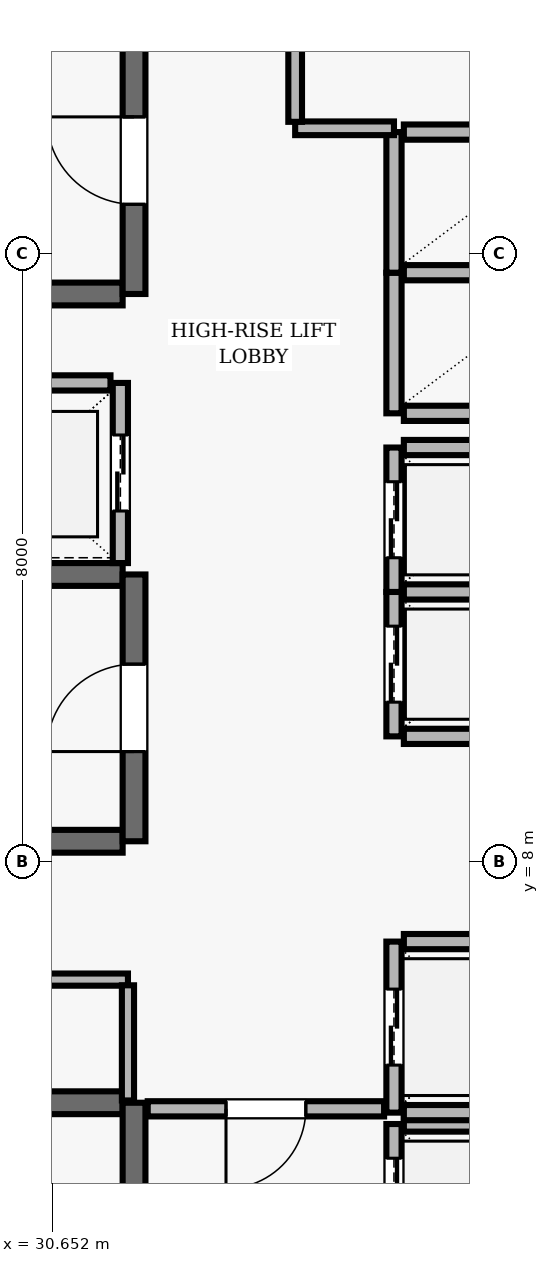
"""IFC4 building model, lengths in metres.
Left out: names, types, materials, properties, quantities, classifications, styles, units other than length and angle.
Written with IfcOpenShell. Run it as: python <this file> out.ifc"""

import sys

from ifc_helpers import new_model, si_unit, direction, frame, frame_2d, origin, place, context, subcontext, project, spatial, rectangle, extrude, element, fill, save


model = new_model("IFC4")
c1 = context("Model", 3, precision=1e-05, world=origin(), true_north=direction((0.0, 1.0)))
c2 = subcontext(c1, "Body", "Model", "MODEL_VIEW")
j1 = project(units=[si_unit("LENGTHUNIT", "METRE"), si_unit("PLANEANGLEUNIT", "RADIAN")], contexts=[c1])
p1 = place(None, origin())
s1 = spatial("IfcSite", under=j1, at=p1, CompositionType="ELEMENT")
p2 = place(p1, origin())
s2 = spatial("IfcBuilding", under=s1, at=p2, CompositionType="ELEMENT")
p3 = place(p2, frame((0.0, 0.0, 252.1)))
s3 = spatial("IfcBuildingStorey", under=s2, at=p3, CompositionType="ELEMENT", Elevation=252.1)
p4 = place(p3, frame((31.58, 4.83, 0.0), z_axis=(0.0, 0.0, 1.0), x_axis=(-1.0, 0.0, 0.0)))
e1 = element("IfcWall", 1, at=p4, inside=s3, PredefinedType="SHEAR", context=c2, shape_type="SweptSolid", body=[
    extrude(rectangle(XDim=8.36, YDim=0.3, at=frame_2d((4.18, 0.0))), origin(), (0.0, 0.0, 1.0), 3.69),
])
p5 = place(p3, frame((31.73, 0.96, 0.0), z_axis=(0.0, 0.0, 1.0), x_axis=(0.0, 1.0, 0.0)))
e2 = element("IfcWall", 2, at=p5, inside=s3, PredefinedType="SHEAR", context=c2, shape_type="SweptSolid", body=[
    extrude(rectangle(XDim=3.87, YDim=0.3, at=frame_2d((1.935, 0.0))), origin(), (0.0, 0.0, 1.0), 3.69),
])
p6 = place(p5, frame((1.54, 0.0, 0.0)))
e3 = element("IfcOpeningElement", 3, at=p6, cuts=e2, PredefinedType="OPENING", context=c2, shape_type="SweptSolid", body=[
    extrude(rectangle(XDim=1.15, YDim=2.15, at=frame_2d((0.575, 1.075))), frame((0.0, 0.16, 0.0), z_axis=(0.0, -1.0, 0.0), x_axis=(1.0, 0.0, 0.0)), (0.0, 0.0, 1.0), 0.32),
])
p7 = place(p3, frame((23.22, 15.47, 0.0), z_axis=(0.0, 0.0, 1.0), x_axis=(1.0, 0.0, 0.0)))
e4 = element("IfcWall", 4, at=p7, inside=s3, PredefinedType="SHEAR", context=c2, shape_type="SweptSolid", body=[
    extrude(rectangle(XDim=8.36, YDim=0.3, at=frame_2d((4.18, 0.0))), origin(), (0.0, 0.0, 1.0), 3.69),
])
p8 = place(p3, frame((31.73, 15.47, 0.0), z_axis=(0.0, 0.0, 1.0), x_axis=(0.0, 1.0, 0.0)))
e5 = element("IfcWall", 5, at=p8, inside=s3, PredefinedType="SHEAR", context=c2, shape_type="SweptSolid", body=[
    extrude(rectangle(XDim=3.51, YDim=0.3, at=frame_2d((1.755, 0.0))), origin(), (0.0, 0.0, 1.0), 3.69),
])
p9 = place(p8, frame((1.18, 0.0, 0.0)))
e6 = element("IfcOpeningElement", 6, at=p9, cuts=e5, PredefinedType="OPENING", context=c2, shape_type="SweptSolid", body=[
    extrude(rectangle(XDim=1.15, YDim=2.15, at=frame_2d((0.575, 1.075))), frame((0.0, 0.16, 0.0), z_axis=(0.0, -1.0, 0.0), x_axis=(1.0, 0.0, 0.0)), (0.0, 0.0, 1.0), 0.32),
])
for number, where, z_axis, x_axis in (
    (7, (31.58, 11.78, 0.0), (0.0, 0.0, 1.0), (-1.0, 0.0, 0.0)),
    (8, (23.22, 8.27, 0.0), (0.0, 0.0, 1.0), (1.0, 0.0, 0.0)),
):
    element("IfcWall", number, at=place(p3, frame(where, z_axis=z_axis, x_axis=x_axis)), inside=s3, PredefinedType="SHEAR", context=c2, shape_type="SweptSolid", body=[
        extrude(rectangle(XDim=8.36, YDim=0.3, at=frame_2d((4.18, 0.0))), origin(), (0.0, 0.0, 1.0), 3.69),
    ])
p10 = place(p3, frame((31.73, 8.27, 0.0), z_axis=(0.0, 0.0, 1.0), x_axis=(0.0, 1.0, 0.0)))
e9 = element("IfcWall", 9, at=p10, inside=s3, PredefinedType="SHEAR", context=c2, shape_type="SweptSolid", body=[
    extrude(rectangle(XDim=3.51, YDim=0.3, at=frame_2d((1.755, 0.0))), origin(), (0.0, 0.0, 1.0), 3.69),
])
p11 = place(p10, frame((1.18, 0.0, 0.0)))
e10 = element("IfcOpeningElement", 10, at=p11, cuts=e9, PredefinedType="OPENING", context=c2, shape_type="SweptSolid", body=[
    extrude(rectangle(XDim=1.15, YDim=2.15, at=frame_2d((0.575, 1.075))), frame((0.0, 0.16, 0.0), z_axis=(0.0, -1.0, 0.0), x_axis=(1.0, 0.0, 0.0)), (0.0, 0.0, 1.0), 0.32),
])
p12 = place(p3, frame((35.15, 4.55, 0.0), z_axis=(0.0, 0.0, 1.0), x_axis=(0.0, -1.0, 0.0)))
e11 = element("IfcWall", 11, at=p12, inside=s3, PredefinedType="SOLIDWALL", context=c2, shape_type="SweptSolid", body=[
    extrude(rectangle(XDim=2.1, YDim=0.2, at=frame_2d((1.05, 0.0))), origin(), (0.0, 0.0, 1.0), 3.69),
])
p13 = place(p12, frame((0.45, 0.0, 0.0)))
e12 = element("IfcOpeningElement", 12, at=p13, cuts=e11, PredefinedType="OPENING", context=c2, shape_type="SweptSolid", body=[
    extrude(rectangle(XDim=1.2, YDim=2.15, at=frame_2d((0.6, 1.075))), frame((0.0, 0.11, 0.0), z_axis=(0.0, -1.0, 0.0), x_axis=(1.0, 0.0, 0.0)), (0.0, 0.0, 1.0), 0.22),
])
p14 = place(p3, frame((37.42, 4.55, 0.0), z_axis=(0.0, 0.0, 1.0), x_axis=(-1.0, 0.0, 0.0)))
e13 = element("IfcWall", 13, at=p14, inside=s3, PredefinedType="SOLIDWALL", context=c2, shape_type="SweptSolid", body=[
    extrude(rectangle(XDim=2.14, YDim=0.2, at=frame_2d((1.07, 0.0))), origin(), (0.0, 0.0, 1.0), 3.69),
])
p15 = place(p3, frame((35.15, 6.95, 0.0), z_axis=(0.0, 0.0, 1.0), x_axis=(0.0, -1.0, 0.0)))
e14 = element("IfcWall", 14, at=p15, inside=s3, PredefinedType="SOLIDWALL", context=c2, shape_type="SweptSolid", body=[
    extrude(rectangle(XDim=2.25, YDim=0.2, at=frame_2d((1.125, 0.0))), origin(), (0.0, 0.0, 1.0), 3.69),
])
p16 = place(p15, frame((0.625, 0.0, 0.0)))
e15 = element("IfcOpeningElement", 15, at=p16, cuts=e14, PredefinedType="OPENING", context=c2, shape_type="SweptSolid", body=[
    extrude(rectangle(XDim=1.0, YDim=2.1, at=frame_2d((0.5, 1.05))), frame((0.0, 0.11, 0.0), z_axis=(0.0, -1.0, 0.0), x_axis=(1.0, 0.0, 0.0)), (0.0, 0.0, 1.0), 0.22),
])
for number, where, z_axis, x_axis in (
    (16, (35.28, 4.7, 0.0), (0.0, 0.0, 1.0), (1.0, 0.0, 0.0)),
    (17, (37.42, 6.95, 0.0), (0.0, 0.0, 1.0), (-1.0, 0.0, 0.0)),
):
    element("IfcWall", number, at=place(p3, frame(where, z_axis=z_axis, x_axis=x_axis)), inside=s3, PredefinedType="SOLIDWALL", context=c2, shape_type="SweptSolid", body=[
        extrude(rectangle(XDim=2.14, YDim=0.2, at=frame_2d((1.07, 0.0))), origin(), (0.0, 0.0, 1.0), 3.69),
    ])
p17 = place(p3, frame((35.15, 11.55, 0.0), z_axis=(0.0, 0.0, 1.0), x_axis=(0.0, -1.0, 0.0)))
e18 = element("IfcWall", 18, at=p17, inside=s3, PredefinedType="SOLIDWALL", context=c2, shape_type="SweptSolid", body=[
    extrude(rectangle(XDim=1.9, YDim=0.2, at=frame_2d((0.95, 0.0))), origin(), (0.0, 0.0, 1.0), 3.69),
])
p18 = place(p17, frame((0.45, 0.0, 0.0)))
e19 = element("IfcOpeningElement", 19, at=p18, cuts=e18, PredefinedType="OPENING", context=c2, shape_type="SweptSolid", body=[
    extrude(rectangle(XDim=1.0, YDim=2.1, at=frame_2d((0.5, 1.05))), frame((0.0, 0.11, 0.0), z_axis=(0.0, -1.0, 0.0), x_axis=(1.0, 0.0, 0.0)), (0.0, 0.0, 1.0), 0.22),
])
for number, where, z_axis, x_axis in (
    (20, (35.28, 9.65, 0.0), (0.0, 0.0, 1.0), (1.0, 0.0, 0.0)),
    (21, (37.42, 11.55, 0.0), (0.0, 0.0, 1.0), (-1.0, 0.0, 0.0)),
):
    element("IfcWall", number, at=place(p3, frame(where, z_axis=z_axis, x_axis=x_axis)), inside=s3, PredefinedType="SOLIDWALL", context=c2, shape_type="SweptSolid", body=[
        extrude(rectangle(XDim=2.14, YDim=0.2, at=frame_2d((1.07, 0.0))), origin(), (0.0, 0.0, 1.0), 3.69),
    ])
p19 = place(p3, frame((35.15, 13.45, 0.0), z_axis=(0.0, 0.0, 1.0), x_axis=(0.0, -1.0, 0.0)))
e22 = element("IfcWall", 22, at=p19, inside=s3, PredefinedType="SOLIDWALL", context=c2, shape_type="SweptSolid", body=[
    extrude(rectangle(XDim=1.9, YDim=0.2, at=frame_2d((0.95, 0.0))), origin(), (0.0, 0.0, 1.0), 3.69),
])
p20 = place(p19, frame((0.45, 0.0, 0.0)))
e23 = element("IfcOpeningElement", 23, at=p20, cuts=e22, PredefinedType="OPENING", context=c2, shape_type="SweptSolid", body=[
    extrude(rectangle(XDim=1.0, YDim=2.1, at=frame_2d((0.5, 1.05))), frame((0.0, 0.11, 0.0), z_axis=(0.0, -1.0, 0.0), x_axis=(1.0, 0.0, 0.0)), (0.0, 0.0, 1.0), 0.22),
])
p21 = place(p3, frame((37.42, 13.45, 0.0), z_axis=(0.0, 0.0, 1.0), x_axis=(-1.0, 0.0, 0.0)))
e24 = element("IfcWall", 24, at=p21, inside=s3, PredefinedType="SOLIDWALL", context=c2, shape_type="SweptSolid", body=[
    extrude(rectangle(XDim=2.14, YDim=0.2, at=frame_2d((1.07, 0.0))), origin(), (0.0, 0.0, 1.0), 3.69),
])
p22 = place(p3, frame((31.55, 11.93, 0.0), z_axis=(0.0, 0.0, 1.0), x_axis=(0.0, 1.0, 0.0)))
e25 = element("IfcWall", 25, at=p22, inside=s3, PredefinedType="SOLIDWALL", context=c2, shape_type="SweptSolid", body=[
    extrude(rectangle(XDim=2.37, YDim=0.2, at=frame_2d((1.185, 0.0))), origin(), (0.0, 0.0, 1.0), 3.69),
])
p23 = place(p22, frame((0.685, 0.0, 0.0)))
e26 = element("IfcOpeningElement", 26, at=p23, cuts=e25, PredefinedType="OPENING", context=c2, shape_type="SweptSolid", body=[
    extrude(rectangle(XDim=1.0, YDim=2.1, at=frame_2d((0.5, 1.05))), frame((0.0, 0.11, 0.0), z_axis=(0.0, -1.0, 0.0), x_axis=(1.0, 0.0, 0.0)), (0.0, 0.0, 1.0), 0.22),
])
p24 = place(p3, frame((31.42, 14.3, 0.0), z_axis=(0.0, 0.0, 1.0), x_axis=(-1.0, 0.0, 0.0)))
e27 = element("IfcWall", 27, at=p24, inside=s3, PredefinedType="SOLIDWALL", context=c2, shape_type="SweptSolid", body=[
    extrude(rectangle(XDim=2.44, YDim=0.2, at=frame_2d((1.22, 0.0))), origin(), (0.0, 0.0, 1.0), 3.69),
])
p25 = place(p3, frame((35.15, 15.75, 0.0), z_axis=(0.0, 0.0, 1.0), x_axis=(0.0, -1.0, 0.0)))
e28 = element("IfcWall", 28, at=p25, inside=s3, PredefinedType="SOLIDWALL", context=c2, shape_type="SweptSolid", body=[
    extrude(rectangle(XDim=1.85, YDim=0.2, at=frame_2d((0.925, 0.0))), origin(), (0.0, 0.0, 1.0), 3.69),
])
for number, where, z_axis, x_axis in (
    (29, (35.28, 13.9, 0.0), (0.0, 0.0, 1.0), (1.0, 0.0, 0.0)),
    (30, (37.42, 15.75, 0.0), (0.0, 0.0, 1.0), (-1.0, 0.0, 0.0)),
):
    element("IfcWall", number, at=place(p3, frame(where, z_axis=z_axis, x_axis=x_axis)), inside=s3, PredefinedType="SOLIDWALL", context=c2, shape_type="SweptSolid", body=[
        extrude(rectangle(XDim=2.14, YDim=0.2, at=frame_2d((1.07, 0.0))), origin(), (0.0, 0.0, 1.0), 3.69),
    ])
p26 = place(p3, frame((35.15, 17.6, 0.0), z_axis=(0.0, 0.0, 1.0), x_axis=(0.0, -1.0, 0.0)))
e31 = element("IfcWall", 31, at=p26, inside=s3, PredefinedType="SOLIDWALL", context=c2, shape_type="SweptSolid", body=[
    extrude(rectangle(XDim=1.85, YDim=0.2, at=frame_2d((0.925, 0.0))), origin(), (0.0, 0.0, 1.0), 3.69),
])
p27 = place(p3, frame((37.42, 17.6, 0.0), z_axis=(0.0, 0.0, 1.0), x_axis=(-1.0, 0.0, 0.0)))
e32 = element("IfcWall", 32, at=p27, inside=s3, PredefinedType="SOLIDWALL", context=c2, shape_type="SweptSolid", body=[
    extrude(rectangle(XDim=2.14, YDim=0.2, at=frame_2d((1.07, 0.0))), origin(), (0.0, 0.0, 1.0), 3.69),
])
p28 = place(p3, frame((28.55, 6.45, 0.0), z_axis=(0.0, 0.0, 1.0), x_axis=(1.0, 0.0, 0.0)))
e33 = element("IfcWall", 33, at=p28, inside=s3, PredefinedType="PARTITIONING", context=c2, shape_type="SweptSolid", body=[
    extrude(rectangle(XDim=3.1, YDim=0.16, at=frame_2d((1.55, 0.0))), origin(), (0.0, 0.0, 1.0), 3.69),
])
p29 = place(p28, frame((1.11, 0.0, 0.0)))
e34 = element("IfcOpeningElement", 34, at=p29, cuts=e33, PredefinedType="OPENING", context=c2, shape_type="SweptSolid", body=[
    extrude(rectangle(XDim=0.88, YDim=2.1, at=frame_2d((0.44, 1.05))), frame((0.0, 0.09, 0.0), z_axis=(0.0, -1.0, 0.0), x_axis=(1.0, 0.0, 0.0)), (0.0, 0.0, 1.0), 0.18),
])
p30 = place(p3, frame((33.85, 17.65, 0.0), z_axis=(0.0, 0.0, 1.0), x_axis=(1.0, 0.0, 0.0)))
e35 = element("IfcWall", 35, at=p30, inside=s3, PredefinedType="PARTITIONING", context=c2, shape_type="SweptSolid", body=[
    extrude(rectangle(XDim=1.3, YDim=0.18, at=frame_2d((0.65, 0.0))), origin(), (0.0, 0.0, 1.0), 3.69),
])
p31 = place(p3, frame((35.02, 4.75, 0.0), z_axis=(0.0, 0.0, 1.0), x_axis=(-1.0, 0.0, 0.0)))
e36 = element("IfcWall", 36, at=p31, inside=s3, PredefinedType="SOLIDWALL", context=c2, shape_type="SweptSolid", body=[
    extrude(rectangle(XDim=3.11, YDim=0.2, at=frame_2d((1.555, 0.0))), origin(), (0.0, 0.0, 1.0), 3.69),
])
p32 = place(p31, frame((1.03, 0.0, 0.0)))
e37 = element("IfcOpeningElement", 37, at=p32, cuts=e36, PredefinedType="OPENING", context=c2, shape_type="SweptSolid", body=[
    extrude(rectangle(XDim=1.05, YDim=2.15, at=frame_2d((0.525, 1.075))), frame((0.0, 0.11, 0.0), z_axis=(0.0, -1.0, 0.0), x_axis=(1.0, 0.0, 0.0)), (0.0, 0.0, 1.0), 0.22),
])
p33 = place(p3, frame((31.65, 4.86, 0.0), z_axis=(0.0, 0.0, 1.0), x_axis=(0.0, 1.0, 0.0)))
e38 = element("IfcWall", 38, at=p33, inside=s3, PredefinedType="PARTITIONING", context=c2, shape_type="SweptSolid", body=[
    extrude(rectangle(XDim=1.515, YDim=0.16, at=frame_2d((0.757, 0.0))), origin(), (0.0, 0.0, 1.0), 3.69),
])
p34 = place(p3, frame((33.85, 17.735, 0.0), z_axis=(0.0, 0.0, 1.0), x_axis=(0.0, 1.0, 0.0)))
e39 = element("IfcWall", 39, at=p34, inside=s3, PredefinedType="PARTITIONING", context=c2, shape_type="SweptSolid", body=[
    extrude(rectangle(XDim=6.03, YDim=0.18, at=frame_2d((3.015, 0.0))), origin(), (0.0, 0.0, 1.0), 3.69),
])
p35 = place(p34, frame((2.54, 0.0, 0.0)))
e40 = element("IfcOpeningElement", 40, at=p35, cuts=e39, PredefinedType="OPENING", context=c2, shape_type="SweptSolid", body=[
    extrude(rectangle(XDim=0.95, YDim=2.1, at=frame_2d((0.475, 1.05))), frame((0.0, 0.1, 0.0), z_axis=(0.0, -1.0, 0.0), x_axis=(1.0, 0.0, 0.0)), (0.0, 0.0, 1.0), 0.2),
])
p36 = place(p9, origin())
e41 = element("IfcDoor", 41, at=p36, inside=s3, OperationType="SINGLE_SWING_RIGHT", PredefinedType="DOOR", context=c2, shape_type="SweptSolid", body=[
    extrude(rectangle(XDim=1.15, YDim=2.15, at=frame_2d((0.575, 1.075))), frame((0.0, 0.025, 0.0), z_axis=(0.0, -1.0, 0.0), x_axis=(1.0, 0.0, 0.0)), (0.0, 0.0, 1.0), 0.05),
])
fill(e6, e41)
p37 = place(p11, origin())
e42 = element("IfcDoor", 42, at=p37, inside=s3, OperationType="SINGLE_SWING_LEFT", PredefinedType="DOOR", context=c2, shape_type="SweptSolid", body=[
    extrude(rectangle(XDim=1.15, YDim=2.15, at=frame_2d((0.575, 1.075))), frame((0.0, 0.025, 0.0), z_axis=(0.0, -1.0, 0.0), x_axis=(1.0, 0.0, 0.0)), (0.0, 0.0, 1.0), 0.05),
])
fill(e10, e42)
p38 = place(p13, origin())
e43 = element("IfcDoor", 43, at=p38, inside=s3, OperationType="DOUBLE_DOOR_SLIDING", PredefinedType="DOOR", context=c2, shape_type="SweptSolid", body=[
    extrude(rectangle(XDim=1.2, YDim=2.15, at=frame_2d((0.6, 1.075))), frame((0.0, 0.025, 0.0), z_axis=(0.0, -1.0, 0.0), x_axis=(1.0, 0.0, 0.0)), (0.0, 0.0, 1.0), 0.05),
])
fill(e12, e43)
p39 = place(p16, origin())
e44 = element("IfcDoor", 44, at=p39, inside=s3, OperationType="DOUBLE_DOOR_SLIDING", PredefinedType="DOOR", context=c2, shape_type="SweptSolid", body=[
    extrude(rectangle(XDim=1.0, YDim=2.1, at=frame_2d((0.5, 1.05))), frame((0.0, 0.025, 0.0), z_axis=(0.0, -1.0, 0.0), x_axis=(1.0, 0.0, 0.0)), (0.0, 0.0, 1.0), 0.05),
])
fill(e15, e44)
p40 = place(p18, origin())
e45 = element("IfcDoor", 45, at=p40, inside=s3, OperationType="DOUBLE_DOOR_SLIDING", PredefinedType="DOOR", context=c2, shape_type="SweptSolid", body=[
    extrude(rectangle(XDim=1.0, YDim=2.1, at=frame_2d((0.5, 1.05))), frame((0.0, 0.025, 0.0), z_axis=(0.0, -1.0, 0.0), x_axis=(1.0, 0.0, 0.0)), (0.0, 0.0, 1.0), 0.05),
])
fill(e19, e45)
p41 = place(p20, origin())
e46 = element("IfcDoor", 46, at=p41, inside=s3, OperationType="DOUBLE_DOOR_SLIDING", PredefinedType="DOOR", context=c2, shape_type="SweptSolid", body=[
    extrude(rectangle(XDim=1.0, YDim=2.1, at=frame_2d((0.5, 1.05))), frame((0.0, 0.025, 0.0), z_axis=(0.0, -1.0, 0.0), x_axis=(1.0, 0.0, 0.0)), (0.0, 0.0, 1.0), 0.05),
])
fill(e23, e46)
p42 = place(p23, origin())
e47 = element("IfcDoor", 47, at=p42, inside=s3, OperationType="DOUBLE_DOOR_SLIDING", PredefinedType="DOOR", context=c2, shape_type="SweptSolid", body=[
    extrude(rectangle(XDim=1.0, YDim=2.1, at=frame_2d((0.5, 1.05))), frame((0.0, 0.025, 0.0), z_axis=(0.0, -1.0, 0.0), x_axis=(1.0, 0.0, 0.0)), (0.0, 0.0, 1.0), 0.05),
])
fill(e26, e47)
p43 = place(p32, origin())
e48 = element("IfcDoor", 48, at=p43, inside=s3, OperationType="SINGLE_SWING_RIGHT", PredefinedType="DOOR", context=c2, shape_type="SweptSolid", body=[
    extrude(rectangle(XDim=1.05, YDim=2.15, at=frame_2d((0.525, 1.075))), frame((0.0, 0.025, 0.0), z_axis=(0.0, -1.0, 0.0), x_axis=(1.0, 0.0, 0.0)), (0.0, 0.0, 1.0), 0.05),
])
fill(e37, e48)
save(model, sys.argv[1])
